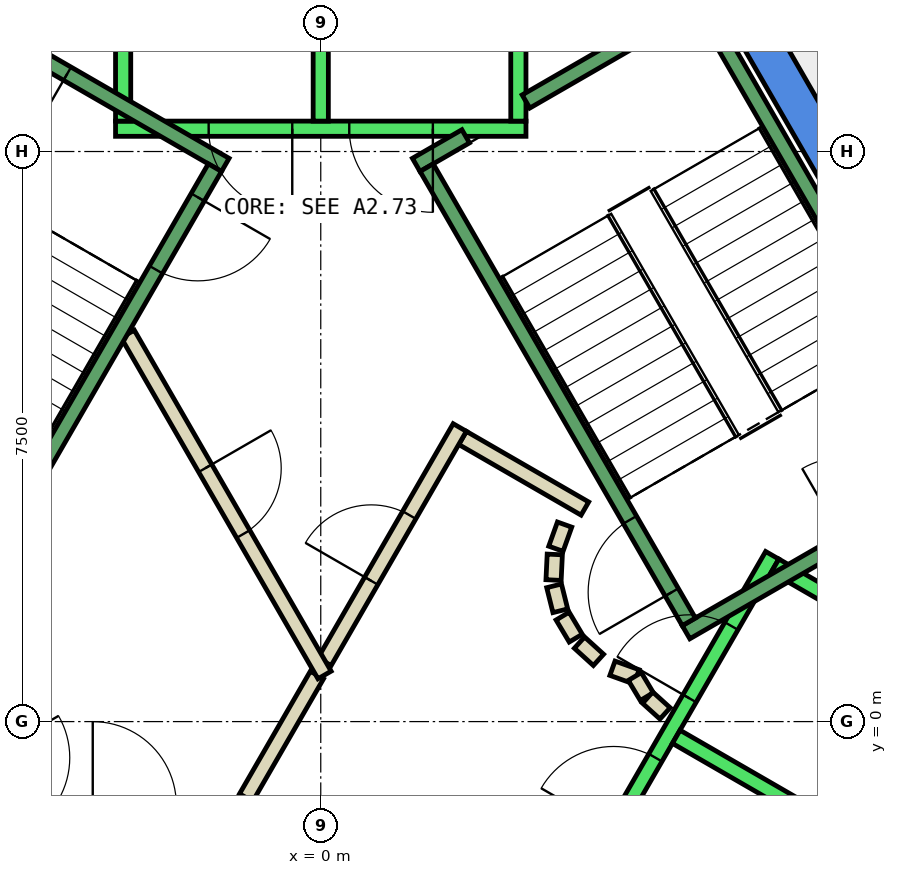
"""IFC4 building model, lengths in metres.
Left out: names, types, materials, properties, quantities, classifications, styles, units other than length and angle.
Written with IfcOpenShell. Run it as: python <this file> out.ifc"""

import sys

from ifc_helpers import new_model, si_unit, direction, frame, frame_2d, origin, place, context, subcontext, project, spatial, polyline, rectangle, outline, extrude, element, fill, save


model = new_model("IFC4")
c1 = context("Model", 3, precision=1e-05, world=origin(), true_north=direction((0.0, 1.0)))
c2 = subcontext(c1, "Body", "Model", "MODEL_VIEW")
j1 = project(units=[si_unit("LENGTHUNIT", "METRE"), si_unit("PLANEANGLEUNIT", "RADIAN")], contexts=[c1])
p1 = place(None, origin())
s1 = spatial("IfcSite", under=j1, at=p1, CompositionType="ELEMENT")
p2 = place(p1, origin())
s2 = spatial("IfcBuilding", under=s1, at=p2, CompositionType="ELEMENT")
p3 = place(p2, frame((0.0, 0.0, 344.9)))
s3 = spatial("IfcBuildingStorey", under=s2, at=p3, CompositionType="ELEMENT", Elevation=344.9)
p4 = place(p3, frame((0.0, 0.0, -0.35)))
e1 = element("IfcWall", 1, at=p4, inside=s3, PredefinedType="SHEAR", context=c2, shape_type="SweptSolid", body=[
    extrude(outline(polyline([(5.486, 9.998), (5.053, 9.748), (9.238, 2.5), (9.815, 2.5), (5.486, 9.998)])), origin(), (0.0, 0.0, 1.0), 4.4),
])
p5 = place(p3, frame((0.0, 0.0, -0.35)))
e2 = element("IfcWall", 2, at=p5, inside=s3, PredefinedType="SHEAR", context=c2, shape_type="SweptSolid", body=[
    extrude(outline(polyline([(4.907, -6.0), (9.815, 2.5), (9.238, 2.5), (4.619, -5.5), (4.907, -6.0)])), origin(), (0.0, 0.0, 1.0), 4.4),
])
p6 = place(p3, frame((-0.982, -1.0, 0.0), z_axis=(0.0, 0.0, 1.0), x_axis=(0.50024047865, 0.865886518847, 0.0)))
e3 = element("IfcWall", 3, at=p6, inside=s3, PredefinedType="PARTITIONING", context=c2, shape_type="SweptSolid", body=[
    extrude(rectangle(XDim=1.863, YDim=0.2, at=frame_2d((0.931, 0.0))), origin(), (0.0, 0.0, 1.0), 4.05),
])
p7 = place(p3, frame((1.866, 3.732, 0.0), z_axis=(0.0, 0.0, 1.0), x_axis=(0.866043361281, -0.499968895414, 0.0)))
e4 = element("IfcWall", 4, at=p7, inside=s3, PredefinedType="PARTITIONING", context=c2, shape_type="SweptSolid", body=[
    extrude(rectangle(XDim=1.858, YDim=0.2, at=frame_2d((0.929, 0.0))), origin(), (0.0, 0.0, 1.0), 4.05),
])
p8 = place(p3, frame((3.208, 2.592, 0.0), z_axis=(0.0, 0.0, 1.0), x_axis=(-0.337388820924, -0.941365382578, 0.0)))
e5 = element("IfcWall", 5, at=p8, inside=s3, PredefinedType="PARTITIONING", context=c2, shape_type="SweptSolid", body=[
    extrude(rectangle(XDim=0.338, YDim=0.2, at=frame_2d((0.169, 0.0))), origin(), (0.0, 0.0, 1.0), 4.05),
])
p9 = place(p3, frame((3.079, 2.199, 0.0), z_axis=(0.0, 0.0, 1.0), x_axis=(-0.047771483479, -0.998858290933, 0.0)))
e6 = element("IfcWall", 6, at=p9, inside=s3, PredefinedType="PARTITIONING", context=c2, shape_type="SweptSolid", body=[
    extrude(rectangle(XDim=0.337, YDim=0.2, at=frame_2d((0.169, 0.0))), origin(), (0.0, 0.0, 1.0), 4.05),
])
p10 = place(p3, frame((3.07, 1.786, 0.0), z_axis=(0.0, 0.0, 1.0), x_axis=(0.242705583207, -0.970099994784, 0.0)))
e7 = element("IfcWall", 7, at=p10, inside=s3, PredefinedType="PARTITIONING", context=c2, shape_type="SweptSolid", body=[
    extrude(rectangle(XDim=0.338, YDim=0.2, at=frame_2d((0.169, 0.0))), origin(), (0.0, 0.0, 1.0), 4.05),
])
for number, where, z_axis, x_axis in (
    (8, (3.182, 1.388, 0.0), (0.0, 0.0, 1.0), (0.512, -0.859, 0.0)),
    (9, (3.404, 1.039, 0.0), (0.0, 0.0, 1.0), (0.74, -0.672, 0.0)),
):
    element("IfcWall", number, at=place(p3, frame(where, z_axis=z_axis, x_axis=x_axis)), inside=s3, PredefinedType="PARTITIONING", context=c2, shape_type="SweptSolid", body=[
        extrude(rectangle(XDim=0.338, YDim=0.2, at=frame_2d((0.169, 0.0))), origin(), (0.0, 0.0, 1.0), 4.05),
    ])
p11 = place(p3, frame((3.838, 0.702, 0.0), z_axis=(0.0, 0.0, 1.0), x_axis=(0.941035081519, -0.338308993895, 0.0)))
e10 = element("IfcWall", 10, at=p11, inside=s3, PredefinedType="PARTITIONING", context=c2, shape_type="SweptSolid", body=[
    extrude(rectangle(XDim=0.337, YDim=0.2, at=frame_2d((0.168, 0.0))), origin(), (0.0, 0.0, 1.0), 4.05),
])
p12 = place(p3, frame((4.132, 0.593, 0.0), z_axis=(0.0, 0.0, 1.0), x_axis=(0.513561617048, -0.858052717201, 0.0)))
e11 = element("IfcWall", 11, at=p12, inside=s3, PredefinedType="PARTITIONING", context=c2, shape_type="SweptSolid", body=[
    extrude(rectangle(XDim=0.308, YDim=0.2, at=frame_2d((0.154, 0.0))), origin(), (0.0, 0.0, 1.0), 4.05),
])
p13 = place(p3, frame((4.301, 0.315, 0.0), z_axis=(0.0, 0.0, 1.0), x_axis=(0.741798017506, -0.670623367639, 0.0)))
e12 = element("IfcWall", 12, at=p13, inside=s3, PredefinedType="PARTITIONING", context=c2, shape_type="SweptSolid", body=[
    extrude(rectangle(XDim=0.309, YDim=0.2, at=frame_2d((0.154, 0.0))), origin(), (0.0, 0.0, 1.0), 4.05),
])
p14 = place(p3, frame((0.05, 0.787, 0.0), z_axis=(0.0, 0.0, 1.0), x_axis=(0.499954076797, 0.866051915934, 0.0)))
e13 = element("IfcWall", 13, at=p14, inside=s3, PredefinedType="PARTITIONING", context=c2, shape_type="SweptSolid", body=[
    extrude(rectangle(XDim=3.558, YDim=0.2, at=frame_2d((1.779, 0.0))), origin(), (0.0, 0.0, 1.0), 4.05),
])
p15 = place(p14, frame((1.229, 0.0, 0.0)))
e14 = element("IfcOpeningElement", 14, at=p15, cuts=e13, PredefinedType="OPENING", context=c2, shape_type="SweptSolid", body=[
    extrude(rectangle(XDim=1.0, YDim=2.1, at=frame_2d((0.5, 1.05))), frame((0.0, 0.11, 0.0), z_axis=(0.0, -1.0, 0.0), x_axis=(1.0, 0.0, 0.0)), (0.0, 0.0, 1.0), 0.22),
])
p16 = place(p3, frame((-2.54, 5.1, 0.0), z_axis=(0.0, 0.0, 1.0), x_axis=(0.499925051871, -0.866068670783, 0.0)))
e15 = element("IfcWall", 15, at=p16, inside=s3, PredefinedType="PARTITIONING", context=c2, shape_type="SweptSolid", body=[
    extrude(rectangle(XDim=5.181, YDim=0.2, at=frame_2d((2.59, 0.0))), origin(), (0.0, 0.0, 1.0), 4.05),
])
p17 = place(p16, frame((2.04, 0.0, 0.0)))
e16 = element("IfcOpeningElement", 16, at=p17, cuts=e15, PredefinedType="OPENING", context=c2, shape_type="SweptSolid", body=[
    extrude(rectangle(XDim=1.0, YDim=2.1, at=frame_2d((0.5, 1.05))), frame((0.0, 0.11, 0.0), z_axis=(0.0, -1.0, 0.0), x_axis=(1.0, 0.0, 0.0)), (0.0, 0.0, 1.0), 0.22),
])
p18 = place(p3, frame((2.7, 7.8, 0.0), z_axis=(0.0, 0.0, 1.0), x_axis=(-1.0, 0.0, 0.0)))
e17 = element("IfcWall", 17, at=p18, inside=s3, PredefinedType="STANDARD", context=c2, shape_type="SweptSolid", body=[
    extrude(rectangle(XDim=5.4, YDim=0.2, at=frame_2d((2.7, 0.0))), origin(), (0.0, 0.0, 1.0), 4.05),
])
p19 = place(p18, frame((1.225, 0.0, 0.0)))
e18 = element("IfcOpeningElement", 18, at=p19, cuts=e17, PredefinedType="OPENING", context=c2, shape_type="SweptSolid", body=[
    extrude(rectangle(XDim=1.1, YDim=2.1, at=frame_2d((0.55, 1.05))), frame((0.0, 0.11, 0.0), z_axis=(0.0, -1.0, 0.0), x_axis=(1.0, 0.0, 0.0)), (0.0, 0.0, 1.0), 0.22),
])
p20 = place(p18, frame((3.075, 0.0, 0.0)))
e19 = element("IfcOpeningElement", 19, at=p20, cuts=e17, PredefinedType="OPENING", context=c2, shape_type="SweptSolid", body=[
    extrude(rectangle(XDim=1.1, YDim=2.1, at=frame_2d((0.55, 1.05))), frame((0.0, 0.11, 0.0), z_axis=(0.0, -1.0, 0.0), x_axis=(1.0, 0.0, 0.0)), (0.0, 0.0, 1.0), 0.22),
])
for number, where, z_axis, x_axis in (
    (20, (2.6, 7.9, 0.0), (0.0, 0.0, 1.0), (0.0, 1.0, 0.0)),
    (21, (0.0, 7.9, 0.0), (0.0, 0.0, 1.0), (0.0, 1.0, 0.0)),
    (22, (-2.6, 7.9, 0.0), (0.0, 0.0, 1.0), (0.0, 1.0, 0.0)),
):
    element("IfcWall", number, at=place(p3, frame(where, z_axis=z_axis, x_axis=x_axis)), inside=s3, PredefinedType="STANDARD", context=c2, shape_type="SweptSolid", body=[
        extrude(rectangle(XDim=2.4, YDim=0.2, at=frame_2d((1.2, 0.0))), origin(), (0.0, 0.0, 1.0), 4.05),
    ])
p21 = place(p3, frame((-5.94, 2.188, 0.0), z_axis=(0.0, 0.0, 1.0), x_axis=(0.500034260056, -0.866005622828, 0.0)))
e23 = element("IfcWall", 23, at=p21, inside=s3, PredefinedType="STANDARD", context=c2, shape_type="SweptSolid", body=[
    extrude(rectangle(XDim=5.399, YDim=0.2, at=frame_2d((2.7, 0.0))), origin(), (0.0, 0.0, 1.0), 4.05),
])
p22 = place(p21, frame((3.075, 0.0, 0.0)))
e24 = element("IfcOpeningElement", 24, at=p22, cuts=e23, PredefinedType="OPENING", context=c2, shape_type="SweptSolid", body=[
    extrude(rectangle(XDim=1.1, YDim=2.1, at=frame_2d((0.55, 1.05))), frame((0.0, 0.11, 0.0), z_axis=(0.0, -1.0, 0.0), x_axis=(1.0, 0.0, 0.0)), (0.0, 0.0, 1.0), 0.22),
])
p23 = place(p21, frame((1.225, 0.0, 0.0)))
e25 = element("IfcOpeningElement", 25, at=p23, cuts=e23, PredefinedType="OPENING", context=c2, shape_type="SweptSolid", body=[
    extrude(rectangle(XDim=1.1, YDim=2.1, at=frame_2d((0.55, 1.05))), frame((0.0, 0.11, 0.0), z_axis=(0.0, -1.0, 0.0), x_axis=(1.0, 0.0, 0.0)), (0.0, 0.0, 1.0), 0.22),
])
p24 = place(p3, frame((3.24, -2.488, 0.0), z_axis=(0.0, 0.0, 1.0), x_axis=(0.500034260056, 0.866005622828, 0.0)))
e26 = element("IfcWall", 26, at=p24, inside=s3, PredefinedType="STANDARD", context=c2, shape_type="SweptSolid", body=[
    extrude(rectangle(XDim=5.399, YDim=0.2, at=frame_2d((2.7, 0.0))), origin(), (0.0, 0.0, 1.0), 4.05),
])
p25 = place(p24, frame((3.225, 0.0, 0.0)))
e27 = element("IfcOpeningElement", 27, at=p25, cuts=e26, PredefinedType="OPENING", context=c2, shape_type="SweptSolid", body=[
    extrude(rectangle(XDim=1.1, YDim=2.1, at=frame_2d((0.55, 1.05))), frame((0.0, 0.11, 0.0), z_axis=(0.0, -1.0, 0.0), x_axis=(1.0, 0.0, 0.0)), (0.0, 0.0, 1.0), 0.22),
])
p26 = place(p24, frame((1.225, 0.0, 0.0)))
e28 = element("IfcOpeningElement", 28, at=p26, cuts=e26, PredefinedType="OPENING", context=c2, shape_type="SweptSolid", body=[
    extrude(rectangle(XDim=1.1, YDim=2.1, at=frame_2d((0.55, 1.05))), frame((0.0, 0.11, 0.0), z_axis=(0.0, -1.0, 0.0), x_axis=(1.0, 0.0, 0.0)), (0.0, 0.0, 1.0), 0.22),
])
p27 = place(p3, frame((5.492, -3.788, 0.0), z_axis=(0.0, 0.0, 1.0), x_axis=(0.500034260056, 0.866005622828, 0.0)))
e29 = element("IfcWall", 29, at=p27, inside=s3, PredefinedType="STANDARD", context=c2, shape_type="SweptSolid", body=[
    extrude(rectangle(XDim=5.399, YDim=0.2, at=frame_2d((2.7, 0.0))), origin(), (0.0, 0.0, 1.0), 4.05),
])
for number, where, z_axis, x_axis in (
    (30, (4.677, -0.2, 0.0), (0.0, 0.0, 1.0), (0.866, -0.5, 0.0)),
    (31, (5.977, 2.052, 0.0), (0.0, 0.0, 1.0), (0.866, -0.5, 0.0)),
):
    element("IfcWall", number, at=place(p3, frame(where, z_axis=z_axis, x_axis=x_axis)), inside=s3, PredefinedType="STANDARD", context=c2, shape_type="SweptSolid", body=[
        extrude(rectangle(XDim=2.399, YDim=0.2, at=frame_2d((1.2, 0.0))), origin(), (0.0, 0.0, 1.0), 4.05),
    ])
p28 = place(p3, frame((4.806, 1.176, 0.0), z_axis=(0.0, 0.0, 1.0), x_axis=(0.866059941101, 0.499940174841, 0.0)))
e32 = element("IfcWall", 32, at=p28, inside=s3, PredefinedType="STANDARD", context=c2, shape_type="SweptSolid", body=[
    extrude(rectangle(XDim=4.4, YDim=0.2, at=frame_2d((2.2, 0.0))), origin(), (0.0, 0.0, 1.0), 4.05),
])
p29 = place(p28, frame((2.4, 0.0, 0.0)))
e33 = element("IfcOpeningElement", 33, at=p29, cuts=e32, PredefinedType="OPENING", context=c2, shape_type="SweptSolid", body=[
    extrude(rectangle(XDim=1.1, YDim=2.2, at=frame_2d((0.55, 1.1))), frame((0.0, 0.11, 0.0), z_axis=(0.0, -1.0, 0.0), x_axis=(1.0, 0.0, 0.0)), (0.0, 0.0, 1.0), 0.22),
])
p30 = place(p3, frame((2.7, 8.158, 0.0), z_axis=(0.0, 0.0, 1.0), x_axis=(0.86611865017, 0.499838457731, 0.0)))
e34 = element("IfcWall", 34, at=p30, inside=s3, PredefinedType="STANDARD", context=c2, shape_type="SweptSolid", body=[
    extrude(rectangle(XDim=2.733, YDim=0.2, at=frame_2d((1.366, 0.0))), origin(), (0.0, 0.0, 1.0), 4.05),
])
p31 = place(p3, frame((1.256, 7.324, 0.0), z_axis=(0.0, 0.0, 1.0), x_axis=(0.865915093549, 0.500191014278, 0.0)))
e35 = element("IfcWall", 35, at=p31, inside=s3, PredefinedType="STANDARD", context=c2, shape_type="SweptSolid", body=[
    extrude(rectangle(XDim=0.752, YDim=0.2, at=frame_2d((0.376, 0.0))), origin(), (0.0, 0.0, 1.0), 4.05),
])
p32 = place(p3, frame((4.843, 1.312, 0.0), z_axis=(0.0, 0.0, 1.0), x_axis=(-0.499963383562, 0.866046543262, 0.0)))
e36 = element("IfcWall", 36, at=p32, inside=s3, PredefinedType="STANDARD", context=c2, shape_type="SweptSolid", body=[
    extrude(rectangle(XDim=6.9, YDim=0.2, at=frame_2d((3.45, 0.0))), origin(), (0.0, 0.0, 1.0), 4.05),
])
p33 = place(p32, frame((0.45, 0.0, 0.0)))
e37 = element("IfcOpeningElement", 37, at=p33, cuts=e36, PredefinedType="OPENING", context=c2, shape_type="SweptSolid", body=[
    extrude(rectangle(XDim=1.1, YDim=2.2, at=frame_2d((0.55, 1.1))), frame((0.0, 0.11, 0.0), z_axis=(0.0, -1.0, 0.0), x_axis=(1.0, 0.0, 0.0)), (0.0, 0.0, 1.0), 0.22),
])
p34 = place(p3, frame((8.48, 3.412, 0.0), z_axis=(0.0, 0.0, 1.0), x_axis=(-0.499978703459, 0.866037698999, 0.0)))
e38 = element("IfcWall", 38, at=p34, inside=s3, PredefinedType="STANDARD", context=c2, shape_type="SweptSolid", body=[
    extrude(rectangle(XDim=6.9, YDim=0.2, at=frame_2d((3.45, 0.0))), origin(), (0.0, 0.0, 1.0), 4.05),
])
p35 = place(p3, frame((-1.256, 7.324, 0.0), z_axis=(0.0, 0.0, 1.0), x_axis=(-0.866046073146, 0.499964197906, 0.0)))
e39 = element("IfcWall", 39, at=p35, inside=s3, PredefinedType="STANDARD", context=c2, shape_type="SweptSolid", body=[
    extrude(rectangle(XDim=4.4, YDim=0.2, at=frame_2d((2.2, 0.0))), origin(), (0.0, 0.0, 1.0), 4.05),
])
p36 = place(p35, frame((2.4, 0.0, 0.0)))
e40 = element("IfcOpeningElement", 40, at=p36, cuts=e39, PredefinedType="OPENING", context=c2, shape_type="SweptSolid", body=[
    extrude(rectangle(XDim=1.1, YDim=2.2, at=frame_2d((0.55, 1.1))), frame((0.0, 0.11, 0.0), z_axis=(0.0, -1.0, 0.0), x_axis=(1.0, 0.0, 0.0)), (0.0, 0.0, 1.0), 0.22),
])
p37 = place(p3, frame((-1.393, 7.288, 0.0), z_axis=(0.0, 0.0, 1.0), x_axis=(-0.499963383562, -0.866046543262, 0.0)))
e41 = element("IfcWall", 41, at=p37, inside=s3, PredefinedType="STANDARD", context=c2, shape_type="SweptSolid", body=[
    extrude(rectangle(XDim=6.9, YDim=0.2, at=frame_2d((3.45, 0.0))), origin(), (0.0, 0.0, 1.0), 4.05),
])
p38 = place(p37, frame((0.45, 0.0, 0.0)))
e42 = element("IfcOpeningElement", 42, at=p38, cuts=e41, PredefinedType="OPENING", context=c2, shape_type="SweptSolid", body=[
    extrude(rectangle(XDim=1.1, YDim=2.2, at=frame_2d((0.55, 1.1))), frame((0.0, 0.11, 0.0), z_axis=(0.0, -1.0, 0.0), x_axis=(1.0, 0.0, 0.0)), (0.0, 0.0, 1.0), 0.22),
])
p39 = place(p15, origin())
e43 = element("IfcDoor", 43, at=p39, inside=s3, OperationType="SINGLE_SWING_RIGHT", PredefinedType="DOOR", context=c2, shape_type="SweptSolid", body=[
    extrude(rectangle(XDim=1.0, YDim=2.1, at=frame_2d((0.5, 1.05))), frame((0.0, 0.025, 0.0), z_axis=(0.0, -1.0, 0.0), x_axis=(1.0, 0.0, 0.0)), (0.0, 0.0, 1.0), 0.05),
])
fill(e14, e43)
p40 = place(p17, origin())
e44 = element("IfcDoor", 44, at=p40, inside=s3, OperationType="SINGLE_SWING_RIGHT", PredefinedType="DOOR", context=c2, shape_type="SweptSolid", body=[
    extrude(rectangle(XDim=1.0, YDim=2.1, at=frame_2d((0.5, 1.05))), frame((0.0, 0.025, 0.0), z_axis=(0.0, -1.0, 0.0), x_axis=(1.0, 0.0, 0.0)), (0.0, 0.0, 1.0), 0.05),
])
fill(e16, e44)
p41 = place(p19, origin())
e45 = element("IfcDoor", 45, at=p41, inside=s3, OperationType="SLIDING_TO_LEFT", PredefinedType="DOOR", context=c2, shape_type="SweptSolid", body=[
    extrude(rectangle(XDim=1.1, YDim=2.1, at=frame_2d((0.55, 1.05))), frame((0.0, 0.025, 0.0), z_axis=(0.0, -1.0, 0.0), x_axis=(1.0, 0.0, 0.0)), (0.0, 0.0, 1.0), 0.05),
])
fill(e18, e45)
p42 = place(p20, origin())
e46 = element("IfcDoor", 46, at=p42, inside=s3, OperationType="SLIDING_TO_LEFT", PredefinedType="DOOR", context=c2, shape_type="SweptSolid", body=[
    extrude(rectangle(XDim=1.1, YDim=2.1, at=frame_2d((0.55, 1.05))), frame((0.0, 0.025, 0.0), z_axis=(0.0, -1.0, 0.0), x_axis=(1.0, 0.0, 0.0)), (0.0, 0.0, 1.0), 0.05),
])
fill(e19, e46)
p43 = place(p25, origin())
e47 = element("IfcDoor", 47, at=p43, inside=s3, OperationType="SLIDING_TO_LEFT", PredefinedType="DOOR", context=c2, shape_type="SweptSolid", body=[
    extrude(rectangle(XDim=1.1, YDim=2.1, at=frame_2d((0.55, 1.05))), frame((0.0, 0.025, 0.0), z_axis=(0.0, -1.0, 0.0), x_axis=(1.0, 0.0, 0.0)), (0.0, 0.0, 1.0), 0.05),
])
fill(e27, e47)
p44 = place(p26, origin())
e48 = element("IfcDoor", 48, at=p44, inside=s3, OperationType="SLIDING_TO_LEFT", PredefinedType="DOOR", context=c2, shape_type="SweptSolid", body=[
    extrude(rectangle(XDim=1.1, YDim=2.1, at=frame_2d((0.55, 1.05))), frame((0.0, 0.025, 0.0), z_axis=(0.0, -1.0, 0.0), x_axis=(1.0, 0.0, 0.0)), (0.0, 0.0, 1.0), 0.05),
])
fill(e28, e48)
p45 = place(p33, origin())
e49 = element("IfcDoor", 49, at=p45, inside=s3, OperationType="SINGLE_SWING_LEFT", PredefinedType="DOOR", context=c2, shape_type="SweptSolid", body=[
    extrude(rectangle(XDim=1.1, YDim=2.2, at=frame_2d((0.55, 1.1))), frame((0.0, 0.025, 0.0), z_axis=(0.0, -1.0, 0.0), x_axis=(1.0, 0.0, 0.0)), (0.0, 0.0, 1.0), 0.05),
])
fill(e37, e49)
p46 = place(p38, origin())
e50 = element("IfcDoor", 50, at=p46, inside=s3, OperationType="SINGLE_SWING_LEFT", PredefinedType="DOOR", context=c2, shape_type="SweptSolid", body=[
    extrude(rectangle(XDim=1.1, YDim=2.2, at=frame_2d((0.55, 1.1))), frame((0.0, 0.025, 0.0), z_axis=(0.0, -1.0, 0.0), x_axis=(1.0, 0.0, 0.0)), (0.0, 0.0, 1.0), 0.05),
])
fill(e42, e50)
p47 = place(p36, origin())
e51 = element("IfcDoor", 51, at=p47, inside=s3, OperationType="SINGLE_SWING_LEFT", PredefinedType="DOOR", context=c2, shape_type="SweptSolid", body=[
    extrude(rectangle(XDim=1.1, YDim=2.2, at=frame_2d((0.55, 1.1))), frame((0.0, 0.025, 0.0), z_axis=(0.0, -1.0, 0.0), x_axis=(1.0, 0.0, 0.0)), (0.0, 0.0, 1.0), 0.05),
])
fill(e40, e51)
save(model, sys.argv[1])
